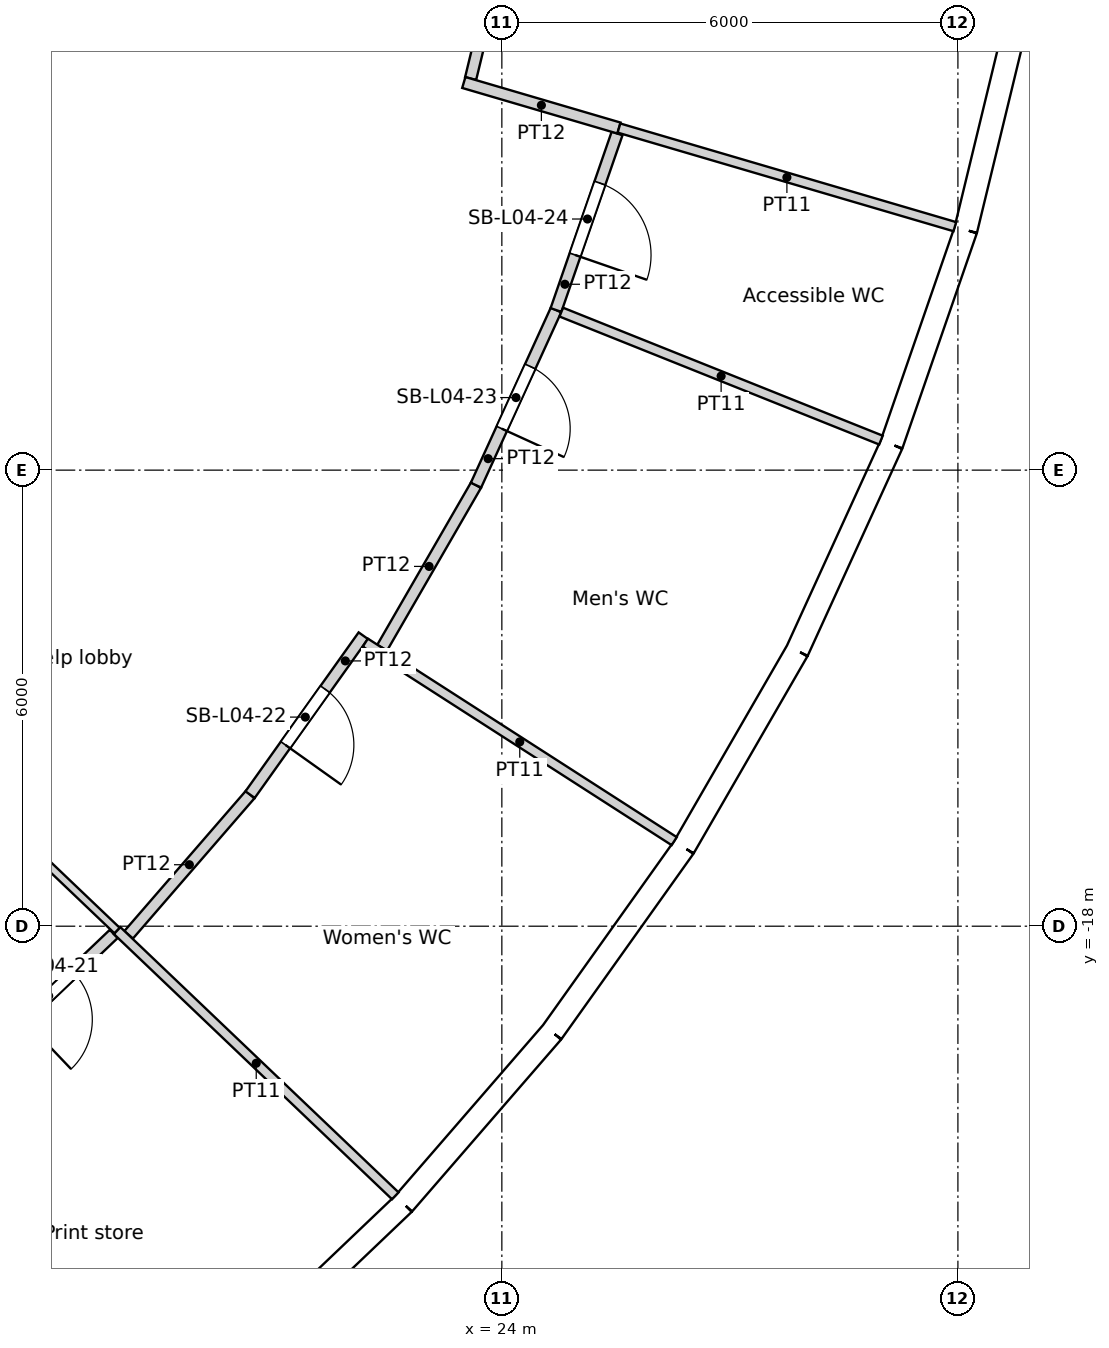
"""IFC4 building model, lengths in metres.
Left out: names, types, materials, properties, quantities, classifications, styles, units other than length and angle.
Written with IfcOpenShell. Run it as: python <this file> out.ifc"""

import sys

from ifc_helpers import new_model, si_unit, direction, frame, frame_2d, origin, origin_2d, place, context, subcontext, project, spatial, rectangle, circle, extrude, element, fill, save


model = new_model("IFC4")
c1 = context("Model", 3, precision=1e-05, world=origin(), true_north=direction((0.0, 1.0)))
c2 = subcontext(c1, "Body", "Model", "MODEL_VIEW")
j1 = project(units=[si_unit("LENGTHUNIT", "METRE"), si_unit("PLANEANGLEUNIT", "RADIAN")], contexts=[c1])
p1 = place(None, origin())
s1 = spatial("IfcSite", under=j1, at=p1, CompositionType="ELEMENT")
p2 = place(p1, origin())
s2 = spatial("IfcBuilding", under=s1, at=p2, CompositionType="ELEMENT")
p3 = place(p2, frame((0.0, 0.0, 23.4)))
s3 = spatial("IfcBuildingStorey", under=s2, at=p3, CompositionType="ELEMENT", Elevation=23.4)
for number, where, z_axis, x_axis in (
    (1, (21.911, -20.892, 0.0), (0.0, 0.0, 1.0), (1.0, 0.0, 0.0)),
    (2, (25.469, -16.368, 0.0), (0.0, 0.0, 1.0), (1.0, 0.0, 0.0)),
    (3, (28.106, -11.252, 0.0), (0.0, 0.0, 1.0), (1.0, 0.0, 0.0)),
):
    element("IfcColumn", number, at=place(p3, frame(where, z_axis=z_axis, x_axis=x_axis)), inside=s3, PredefinedType="COLUMN", context=c2, shape_type="SweptSolid", body=[
        extrude(circle(Radius=0.7, at=origin_2d()), origin(), (0.0, 0.0, 1.0), 4.8),
    ])
for number, where, z_axis, x_axis in (
    (4, (18.805, -15.779, 0.0), (0.0, 0.0, 1.0), (1.0, 0.0, 0.0)),
    (5, (21.937, -11.017, 0.0), (0.0, 0.0, 1.0), (1.0, 0.0, 0.0)),
):
    element("IfcColumn", number, at=place(p3, frame(where, z_axis=z_axis, x_axis=x_axis)), inside=s3, PredefinedType="COLUMN", context=c2, shape_type="SweptSolid", body=[
        extrude(circle(Radius=0.75, at=origin_2d()), origin(), (0.0, 0.0, 1.0), 4.8),
    ])
p4 = place(p3, frame((20.546, -23.711, 0.0), z_axis=(0.0, 0.0, 1.0), x_axis=(0.723750841228, 0.690061388444, 0.0)))
e6 = element("IfcWall", 6, at=p4, inside=s3, PredefinedType="SOLIDWALL", context=c2, shape_type="SweptSolid", body=[
    extrude(rectangle(XDim=2.986, YDim=0.3, at=frame_2d((1.493, 0.0))), origin(), (0.0, 0.0, 1.0), 3.85),
])
p5 = place(p4, frame((1.493, 0.0, 2.0)))
e7 = element("IfcOpeningElement", 7, at=p5, cuts=e6, PredefinedType="OPENING", context=c2, shape_type="SweptSolid", body=[
    extrude(circle(Radius=1.2, at=origin_2d()), frame((0.0, 0.16, 0.0), z_axis=(0.0, -1.0, 0.0), x_axis=(1.0, 0.0, 0.0)), (0.0, 0.0, 1.0), 0.32),
])
p6 = place(p3, frame((22.707, -21.651, 0.0), z_axis=(0.0, 0.0, 1.0), x_axis=(0.654809121128, 0.755794294029, 0.0)))
e8 = element("IfcWall", 8, at=p6, inside=s3, PredefinedType="SOLIDWALL", context=c2, shape_type="SweptSolid", body=[
    extrude(rectangle(XDim=2.986, YDim=0.3, at=frame_2d((1.493, 0.0))), origin(), (0.0, 0.0, 1.0), 4.35),
])
p7 = place(p6, frame((1.493, 0.0, 2.0)))
e9 = element("IfcOpeningElement", 9, at=p7, cuts=e8, PredefinedType="OPENING", context=c2, shape_type="SweptSolid", body=[
    extrude(circle(Radius=1.2, at=origin_2d()), frame((0.0, 0.16, 0.0), z_axis=(0.0, -1.0, 0.0), x_axis=(1.0, 0.0, 0.0)), (0.0, 0.0, 1.0), 0.32),
])
p8 = place(p3, frame((24.662, -19.394, 0.0), z_axis=(0.0, 0.0, 1.0), x_axis=(0.580100533892, 0.814544885551, 0.0)))
e10 = element("IfcWall", 10, at=p8, inside=s3, PredefinedType="SOLIDWALL", context=c2, shape_type="SweptSolid", body=[
    extrude(rectangle(XDim=2.986, YDim=0.3, at=frame_2d((1.493, 0.0))), origin(), (0.0, 0.0, 1.0), 4.35),
])
p9 = place(p8, frame((1.493, 0.0, 2.0)))
e11 = element("IfcOpeningElement", 11, at=p9, cuts=e10, PredefinedType="OPENING", context=c2, shape_type="SweptSolid", body=[
    extrude(circle(Radius=1.2, at=origin_2d()), frame((0.0, 0.16, 0.0), z_axis=(0.0, -1.0, 0.0), x_axis=(1.0, 0.0, 0.0)), (0.0, 0.0, 1.0), 0.32),
])
p10 = place(p3, frame((26.394, -16.962, 0.0), z_axis=(0.0, 0.0, 1.0), x_axis=(0.500017373705, 0.866015372839, 0.0)))
e12 = element("IfcWall", 12, at=p10, inside=s3, PredefinedType="SOLIDWALL", context=c2, shape_type="SweptSolid", body=[
    extrude(rectangle(XDim=2.986, YDim=0.3, at=frame_2d((1.493, 0.0))), origin(), (0.0, 0.0, 1.0), 3.85),
])
p11 = place(p10, frame((1.493, 0.0, 2.0)))
e13 = element("IfcOpeningElement", 13, at=p11, cuts=e12, PredefinedType="OPENING", context=c2, shape_type="SweptSolid", body=[
    extrude(circle(Radius=1.2, at=origin_2d()), frame((0.0, 0.16, 0.0), z_axis=(0.0, -1.0, 0.0), x_axis=(1.0, 0.0, 0.0)), (0.0, 0.0, 1.0), 0.32),
])
p12 = place(p3, frame((27.887, -14.377, 0.0), z_axis=(0.0, 0.0, 1.0), x_axis=(0.415373250944, 0.909651066289, 0.0)))
e14 = element("IfcWall", 14, at=p12, inside=s3, PredefinedType="SOLIDWALL", context=c2, shape_type="SweptSolid", body=[
    extrude(rectangle(XDim=2.986, YDim=0.3, at=frame_2d((1.493, 0.0))), origin(), (0.0, 0.0, 1.0), 4.35),
])
p13 = place(p12, frame((1.493, 0.0, 2.0)))
e15 = element("IfcOpeningElement", 15, at=p13, cuts=e14, PredefinedType="OPENING", context=c2, shape_type="SweptSolid", body=[
    extrude(circle(Radius=1.2, at=origin_2d()), frame((0.0, 0.16, 0.0), z_axis=(0.0, -1.0, 0.0), x_axis=(1.0, 0.0, 0.0)), (0.0, 0.0, 1.0), 0.32),
])
p14 = place(p3, frame((29.127, -11.661, 0.0), z_axis=(0.0, 0.0, 1.0), x_axis=(0.327074054052, 0.944998710669, 0.0)))
e16 = element("IfcWall", 16, at=p14, inside=s3, PredefinedType="SOLIDWALL", context=c2, shape_type="SweptSolid", body=[
    extrude(rectangle(XDim=2.986, YDim=0.3, at=frame_2d((1.493, 0.0))), origin(), (0.0, 0.0, 1.0), 4.35),
])
p15 = place(p14, frame((1.493, 0.0, 2.0)))
e17 = element("IfcOpeningElement", 17, at=p15, cuts=e16, PredefinedType="OPENING", context=c2, shape_type="SweptSolid", body=[
    extrude(circle(Radius=1.2, at=origin_2d()), frame((0.0, 0.16, 0.0), z_axis=(0.0, -1.0, 0.0), x_axis=(1.0, 0.0, 0.0)), (0.0, 0.0, 1.0), 0.32),
])
p16 = place(p3, frame((30.104, -8.839, 0.0), z_axis=(0.0, 0.0, 1.0), x_axis=(0.235756834479, 0.971812078026, 0.0)))
e18 = element("IfcWall", 18, at=p16, inside=s3, PredefinedType="SOLIDWALL", context=c2, shape_type="SweptSolid", body=[
    extrude(rectangle(XDim=2.986, YDim=0.3, at=frame_2d((1.493, 0.0))), origin(), (0.0, 0.0, 1.0), 3.85),
])
p17 = place(p16, frame((1.493, 0.0, 2.0)))
e19 = element("IfcOpeningElement", 19, at=p17, cuts=e18, PredefinedType="OPENING", context=c2, shape_type="SweptSolid", body=[
    extrude(circle(Radius=1.2, at=origin_2d()), frame((0.0, 0.16, 0.0), z_axis=(0.0, -1.0, 0.0), x_axis=(1.0, 0.0, 0.0)), (0.0, 0.0, 1.0), 0.32),
])
p18 = place(p3, frame((18.894, -18.102, 0.0), z_axis=(0.0, 0.0, 1.0), x_axis=(-0.723750392948, -0.690061858609, 0.0)))
e20 = element("IfcWall", 20, at=p18, inside=s3, PredefinedType="PARTITIONING", context=c2, shape_type="SweptSolid", body=[
    extrude(rectangle(XDim=2.428, YDim=0.15, at=frame_2d((1.214, 0.0))), origin(), (0.0, 0.0, 1.0), 3.75),
])
p19 = place(p18, frame((0.733, 0.0, 0.0)))
e21 = element("IfcOpeningElement", 21, at=p19, cuts=e20, PredefinedType="OPENING", context=c2, shape_type="SweptSolid", body=[
    extrude(rectangle(XDim=0.9, YDim=2.1, at=frame_2d((0.45, 1.05))), frame((0.0, 0.075, 0.0), z_axis=(0.0, -1.0, 0.0), x_axis=(1.0, 0.0, 0.0)), (0.0, 0.0, 1.0), 0.15),
])
p20 = place(p3, frame((18.112, -25.435, 0.0), z_axis=(0.0, 0.0, 1.0), x_axis=(-0.580068174904, 0.814567929926, 0.0)))
e22 = element("IfcWall", 22, at=p20, inside=s3, PredefinedType="PARTITIONING", context=c2, shape_type="SweptSolid", body=[
    extrude(rectangle(XDim=5.056, YDim=0.1, at=frame_2d((2.528, 0.0))), origin(), (0.0, 0.0, 1.0), 3.75),
])
p21 = place(p3, frame((18.939, -18.058, 0.0), z_axis=(0.0, 0.0, 1.0), x_axis=(-0.723743423805, 0.690069167909, 0.0)))
e23 = element("IfcWall", 23, at=p21, inside=s3, PredefinedType="PARTITIONING", context=c2, shape_type="SweptSolid", body=[
    extrude(rectangle(XDim=8.2, YDim=0.1, at=frame_2d((4.1, 0.0))), origin(), (0.0, 0.0, 1.0), 3.75),
])
p22 = place(p3, frame((19.09, -18.113, 0.0), z_axis=(0.0, 0.0, 1.0), x_axis=(0.654884832062, 0.755728692545, 0.0)))
e24 = element("IfcWall", 24, at=p22, inside=s3, PredefinedType="PARTITIONING", context=c2, shape_type="SweptSolid", body=[
    extrude(rectangle(XDim=2.44, YDim=0.15, at=frame_2d((1.22, 0.0))), origin(), (0.0, 0.0, 1.0), 3.75),
])
p23 = place(p3, frame((22.177, -14.178, 0.0), z_axis=(0.0, 0.0, 1.0), x_axis=(-0.580050037968, -0.814580845253, 0.0)))
e25 = element("IfcWall", 25, at=p23, inside=s3, PredefinedType="PARTITIONING", context=c2, shape_type="SweptSolid", body=[
    extrude(rectangle(XDim=2.567, YDim=0.15, at=frame_2d((1.284, 0.0))), origin(), (0.0, 0.0, 1.0), 3.75),
])
p24 = place(p23, frame((0.865, 0.0, 0.0)))
e26 = element("IfcOpeningElement", 26, at=p24, cuts=e25, PredefinedType="OPENING", context=c2, shape_type="SweptSolid", body=[
    extrude(rectangle(XDim=0.9, YDim=2.1, at=frame_2d((0.45, 1.05))), frame((0.0, 0.075, 0.0), z_axis=(0.0, -1.0, 0.0), x_axis=(1.0, 0.0, 0.0)), (0.0, 0.0, 1.0), 0.15),
])
p25 = place(p3, frame((22.426, -14.336, 0.0), z_axis=(0.0, 0.0, 1.0), x_axis=(0.499967837645, 0.866043971933, 0.0)))
e27 = element("IfcWall", 27, at=p25, inside=s3, PredefinedType="PARTITIONING", context=c2, shape_type="SweptSolid", body=[
    extrude(rectangle(XDim=2.469, YDim=0.15, at=frame_2d((1.234, 0.0))), origin(), (0.0, 0.0, 1.0), 3.75),
])
p26 = place(p3, frame((22.598, -21.547, 0.0), z_axis=(0.0, 0.0, 1.0), x_axis=(-0.723735862307, 0.690077098309, 0.0)))
e28 = element("IfcWall", 28, at=p26, inside=s3, PredefinedType="PARTITIONING", context=c2, shape_type="SweptSolid", body=[
    extrude(rectangle(XDim=5.056, YDim=0.125, at=frame_2d((2.528, 0.0))), origin(), (0.0, 0.0, 1.0), 3.75),
])
p27 = place(p3, frame((23.589, -6.848, 0.0), z_axis=(0.0, 0.0, 1.0), x_axis=(0.235751338273, 0.971813411362, 0.0)))
e29 = element("IfcWall", 29, at=p27, inside=s3, PredefinedType="PARTITIONING", context=c2, shape_type="SweptSolid", body=[
    extrude(rectangle(XDim=2.263, YDim=0.15, at=frame_2d((1.131, 0.0))), origin(), (0.0, 0.0, 1.0), 3.75),
])
p28 = place(p3, frame((24.712, -9.893, 0.0), z_axis=(0.0, 0.0, 1.0), x_axis=(-0.415479591096, -0.909602500757, 0.0)))
e30 = element("IfcWall", 30, at=p28, inside=s3, PredefinedType="PARTITIONING", context=c2, shape_type="SweptSolid", body=[
    extrude(rectangle(XDim=2.533, YDim=0.15, at=frame_2d((1.267, 0.0))), origin(), (0.0, 0.0, 1.0), 3.75),
])
p29 = place(p28, frame((0.817, 0.0, 0.0)))
e31 = element("IfcOpeningElement", 31, at=p29, cuts=e30, PredefinedType="OPENING", context=c2, shape_type="SweptSolid", body=[
    extrude(rectangle(XDim=0.9, YDim=2.1, at=frame_2d((0.45, 1.05))), frame((0.0, 0.075, 0.0), z_axis=(0.0, -1.0, 0.0), x_axis=(1.0, 0.0, 0.0)), (0.0, 0.0, 1.0), 0.15),
])
p30 = place(p3, frame((25.516, -7.571, 0.0), z_axis=(0.0, 0.0, 1.0), x_axis=(-0.326994566999, -0.945026218236, 0.0)))
e32 = element("IfcWall", 32, at=p30, inside=s3, PredefinedType="PARTITIONING", context=c2, shape_type="SweptSolid", body=[
    extrude(rectangle(XDim=2.458, YDim=0.15, at=frame_2d((1.229, 0.0))), origin(), (0.0, 0.0, 1.0), 3.75),
])
p31 = place(p30, frame((0.691, 0.0, 0.0)))
e33 = element("IfcOpeningElement", 33, at=p31, cuts=e32, PredefinedType="OPENING", context=c2, shape_type="SweptSolid", body=[
    extrude(rectangle(XDim=1.0, YDim=2.1, at=frame_2d((0.5, 1.05))), frame((0.0, 0.075, 0.0), z_axis=(0.0, -1.0, 0.0), x_axis=(1.0, 0.0, 0.0)), (0.0, 0.0, 1.0), 0.15),
])
p32 = place(p3, frame((25.541, -7.5, 0.0), z_axis=(0.0, 0.0, 1.0), x_axis=(-0.959493318184, 0.281731383344, 0.0)))
e34 = element("IfcWall", 34, at=p32, inside=s3, PredefinedType="PARTITIONING", context=c2, shape_type="SweptSolid", body=[
    extrude(rectangle(XDim=2.127, YDim=0.15, at=frame_2d((1.064, 0.0))), origin(), (0.0, 0.0, 1.0), 3.75),
])
p33 = place(p3, frame((26.268, -16.881, 0.0), z_axis=(0.0, 0.0, 1.0), x_axis=(-0.841255646812, 0.540637528023, 0.0)))
e35 = element("IfcWall", 35, at=p33, inside=s3, PredefinedType="PARTITIONING", context=c2, shape_type="SweptSolid", body=[
    extrude(rectangle(XDim=4.831, YDim=0.125, at=frame_2d((2.415, 0.0))), origin(), (0.0, 0.0, 1.0), 3.75),
])
p34 = place(p3, frame((28.988, -11.605, 0.0), z_axis=(0.0, 0.0, 1.0), x_axis=(-0.928353988121, 0.371697286431, 0.0)))
e36 = element("IfcWall", 36, at=p34, inside=s3, PredefinedType="PARTITIONING", context=c2, shape_type="SweptSolid", body=[
    extrude(rectangle(XDim=4.53, YDim=0.125, at=frame_2d((2.265, 0.0))), origin(), (0.0, 0.0, 1.0), 3.75),
])
p35 = place(p3, frame((29.959, -8.797, 0.0), z_axis=(0.0, 0.0, 1.0), x_axis=(-0.959497930404, 0.281715675019, 0.0)))
e37 = element("IfcWall", 37, at=p35, inside=s3, PredefinedType="PARTITIONING", context=c2, shape_type="SweptSolid", body=[
    extrude(rectangle(XDim=4.605, YDim=0.125, at=frame_2d((2.303, 0.0))), origin(), (0.0, 0.0, 1.0), 3.75),
])
p36 = place(p5, origin())
e38 = element("IfcWindow", 38, at=p36, inside=s3, PartitioningType="SINGLE_PANEL", PredefinedType="WINDOW", context=c2, shape_type="SweptSolid", body=[
    extrude(circle(Radius=1.2, at=origin_2d()), frame((0.0, 0.12, 0.0), z_axis=(0.0, -1.0, 0.0), x_axis=(1.0, 0.0, 0.0)), (0.0, 0.0, 1.0), 0.1),
])
fill(e7, e38)
p37 = place(p7, origin())
e39 = element("IfcWindow", 39, at=p37, inside=s3, PartitioningType="SINGLE_PANEL", PredefinedType="WINDOW", context=c2, shape_type="SweptSolid", body=[
    extrude(circle(Radius=1.2, at=origin_2d()), frame((0.0, 0.12, 0.0), z_axis=(0.0, -1.0, 0.0), x_axis=(1.0, 0.0, 0.0)), (0.0, 0.0, 1.0), 0.1),
])
fill(e9, e39)
p38 = place(p9, origin())
e40 = element("IfcWindow", 40, at=p38, inside=s3, PartitioningType="SINGLE_PANEL", PredefinedType="WINDOW", context=c2, shape_type="SweptSolid", body=[
    extrude(circle(Radius=1.2, at=origin_2d()), frame((0.0, 0.12, 0.0), z_axis=(0.0, -1.0, 0.0), x_axis=(1.0, 0.0, 0.0)), (0.0, 0.0, 1.0), 0.1),
])
fill(e11, e40)
p39 = place(p11, origin())
e41 = element("IfcWindow", 41, at=p39, inside=s3, PartitioningType="SINGLE_PANEL", PredefinedType="WINDOW", context=c2, shape_type="SweptSolid", body=[
    extrude(circle(Radius=1.2, at=origin_2d()), frame((0.0, 0.12, 0.0), z_axis=(0.0, -1.0, 0.0), x_axis=(1.0, 0.0, 0.0)), (0.0, 0.0, 1.0), 0.1),
])
fill(e13, e41)
p40 = place(p13, origin())
e42 = element("IfcWindow", 42, at=p40, inside=s3, PartitioningType="SINGLE_PANEL", PredefinedType="WINDOW", context=c2, shape_type="SweptSolid", body=[
    extrude(circle(Radius=1.2, at=origin_2d()), frame((0.0, 0.12, 0.0), z_axis=(0.0, -1.0, 0.0), x_axis=(1.0, 0.0, 0.0)), (0.0, 0.0, 1.0), 0.1),
])
fill(e15, e42)
p41 = place(p15, origin())
e43 = element("IfcWindow", 43, at=p41, inside=s3, PartitioningType="SINGLE_PANEL", PredefinedType="WINDOW", context=c2, shape_type="SweptSolid", body=[
    extrude(circle(Radius=1.2, at=origin_2d()), frame((0.0, 0.12, 0.0), z_axis=(0.0, -1.0, 0.0), x_axis=(1.0, 0.0, 0.0)), (0.0, 0.0, 1.0), 0.1),
])
fill(e17, e43)
p42 = place(p17, origin())
e44 = element("IfcWindow", 44, at=p42, inside=s3, PartitioningType="SINGLE_PANEL", PredefinedType="WINDOW", context=c2, shape_type="SweptSolid", body=[
    extrude(circle(Radius=1.2, at=origin_2d()), frame((0.0, 0.12, 0.0), z_axis=(0.0, -1.0, 0.0), x_axis=(1.0, 0.0, 0.0)), (0.0, 0.0, 1.0), 0.1),
])
fill(e19, e44)
p43 = place(p19, origin())
e45 = element("IfcDoor", 45, at=p43, inside=s3, OperationType="SINGLE_SWING_RIGHT", PredefinedType="DOOR", context=c2, shape_type="SweptSolid", body=[
    extrude(rectangle(XDim=0.9, YDim=2.1, at=frame_2d((0.45, 1.05))), frame((0.0, 0.025, 0.0), z_axis=(0.0, -1.0, 0.0), x_axis=(1.0, 0.0, 0.0)), (0.0, 0.0, 1.0), 0.05),
])
fill(e21, e45)
p44 = place(p24, origin())
e46 = element("IfcDoor", 46, at=p44, inside=s3, OperationType="SINGLE_SWING_RIGHT", PredefinedType="DOOR", context=c2, shape_type="SweptSolid", body=[
    extrude(rectangle(XDim=0.9, YDim=2.1, at=frame_2d((0.45, 1.05))), frame((0.0, 0.025, 0.0), z_axis=(0.0, -1.0, 0.0), x_axis=(1.0, 0.0, 0.0)), (0.0, 0.0, 1.0), 0.05),
])
fill(e26, e46)
p45 = place(p29, origin())
e47 = element("IfcDoor", 47, at=p45, inside=s3, OperationType="SINGLE_SWING_RIGHT", PredefinedType="DOOR", context=c2, shape_type="SweptSolid", body=[
    extrude(rectangle(XDim=0.9, YDim=2.1, at=frame_2d((0.45, 1.05))), frame((0.0, 0.025, 0.0), z_axis=(0.0, -1.0, 0.0), x_axis=(1.0, 0.0, 0.0)), (0.0, 0.0, 1.0), 0.05),
])
fill(e31, e47)
p46 = place(p31, origin())
e48 = element("IfcDoor", 48, at=p46, inside=s3, OperationType="SINGLE_SWING_RIGHT", PredefinedType="DOOR", context=c2, shape_type="SweptSolid", body=[
    extrude(rectangle(XDim=1.0, YDim=2.1, at=frame_2d((0.5, 1.05))), frame((0.0, 0.025, 0.0), z_axis=(0.0, -1.0, 0.0), x_axis=(1.0, 0.0, 0.0)), (0.0, 0.0, 1.0), 0.05),
])
fill(e33, e48)
save(model, sys.argv[1])
